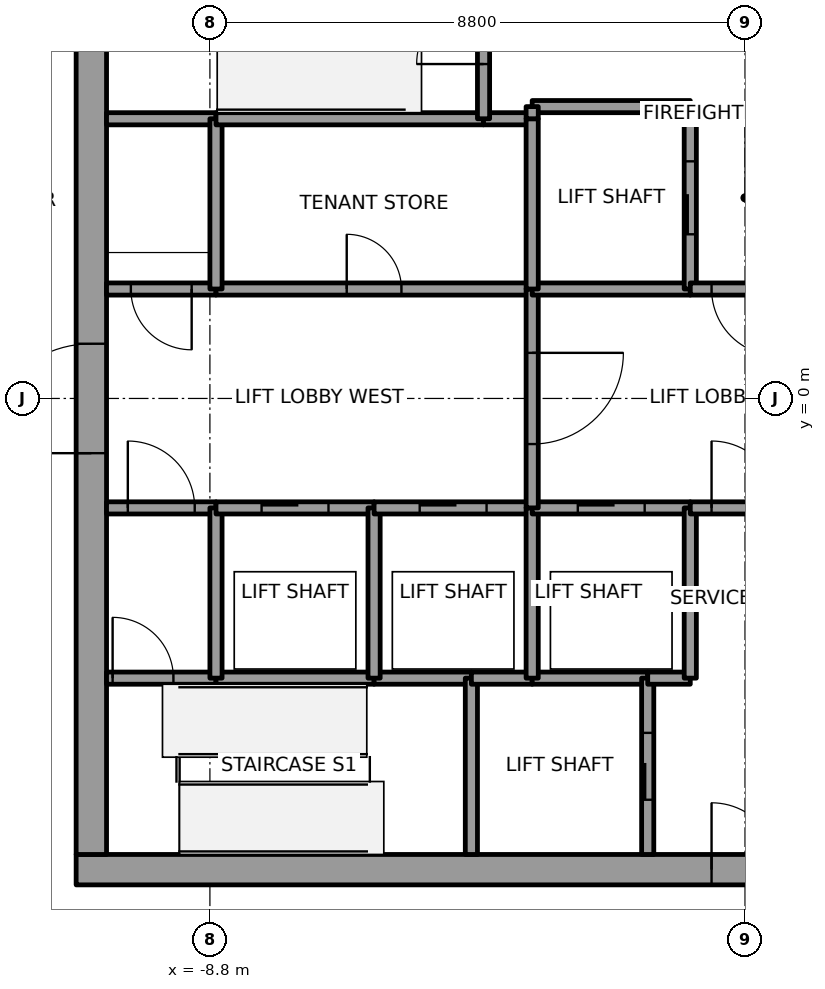
"""IFC4 building model, lengths in metres.
Left out: names, types, materials, properties, quantities, classifications, styles, units other than length and angle.
Written with IfcOpenShell. Run it as: python <this file> out.ifc"""

import sys

from ifc_helpers import new_model, si_unit, direction, frame, frame_2d, origin, place, context, subcontext, project, spatial, rectangle, extrude, element, fill, save


model = new_model("IFC4")
c1 = context("Model", 3, precision=1e-05, world=origin(), true_north=direction((0.0, 1.0)))
c2 = subcontext(c1, "Body", "Model", "MODEL_VIEW")
j1 = project(units=[si_unit("LENGTHUNIT", "METRE"), si_unit("PLANEANGLEUNIT", "RADIAN")], contexts=[c1])
p1 = place(None, origin())
s1 = spatial("IfcSite", under=j1, at=p1, CompositionType="ELEMENT")
p2 = place(p1, origin())
s2 = spatial("IfcBuilding", under=s1, at=p2, CompositionType="ELEMENT")
p3 = place(p2, frame((0.0, 0.0, 231.0)))
s3 = spatial("IfcBuildingStorey", under=s2, at=p3, CompositionType="ELEMENT", Elevation=231.0)
p4 = place(p3, frame((-11.0, -7.75, 0.0), z_axis=(0.0, 0.0, 1.0), x_axis=(1.0, 0.0, 0.0)))
e1 = element("IfcWall", 1, at=p4, inside=s3, PredefinedType="SHEAR", context=c2, shape_type="SweptSolid", body=[
    extrude(rectangle(XDim=22.0, YDim=0.5, at=frame_2d((11.0, 0.0))), origin(), (0.0, 0.0, 1.0), 4.0),
])
p5 = place(p4, frame((10.45, 0.0, 0.0)))
e2 = element("IfcOpeningElement", 2, at=p5, cuts=e1, PredefinedType="OPENING", context=c2, shape_type="SweptSolid", body=[
    extrude(rectangle(XDim=1.1, YDim=2.1, at=frame_2d((0.55, 1.05))), frame((0.0, 0.25, 0.0), z_axis=(0.0, -1.0, 0.0), x_axis=(1.0, 0.0, 0.0)), (0.0, 0.0, 1.0), 0.5),
])
p6 = place(p3, frame((-10.75, -7.5, 0.0), z_axis=(0.0, 0.0, 1.0), x_axis=(0.0, 1.0, 0.0)))
e3 = element("IfcWall", 3, at=p6, inside=s3, PredefinedType="SHEAR", context=c2, shape_type="SweptSolid", body=[
    extrude(rectangle(XDim=15.0, YDim=0.5, at=frame_2d((7.5, 0.0))), origin(), (0.0, 0.0, 1.0), 4.0),
])
p7 = place(p6, frame((6.6, 0.0, 0.0)))
e4 = element("IfcOpeningElement", 4, at=p7, cuts=e3, PredefinedType="OPENING", context=c2, shape_type="SweptSolid", body=[
    extrude(rectangle(XDim=1.8, YDim=2.1, at=frame_2d((0.9, 1.05))), frame((0.0, 0.25, 0.0), z_axis=(0.0, -1.0, 0.0), x_axis=(1.0, 0.0, 0.0)), (0.0, 0.0, 1.0), 0.5),
])
p8 = place(p3, frame((-10.5, -4.6, 0.0), z_axis=(0.0, 0.0, 1.0), x_axis=(1.0, 0.0, 0.0)))
e5 = element("IfcWall", 5, at=p8, inside=s3, PredefinedType="SOLIDWALL", context=c2, shape_type="SweptSolid", body=[
    extrude(rectangle(XDim=1.8, YDim=0.2, at=frame_2d((0.9, 0.0))), origin(), (0.0, 0.0, 1.0), 3.85),
])
p9 = place(p8, frame((0.1, 0.0, 0.0)))
e6 = element("IfcOpeningElement", 6, at=p9, cuts=e5, PredefinedType="OPENING", context=c2, shape_type="SweptSolid", body=[
    extrude(rectangle(XDim=1.0, YDim=2.1, at=frame_2d((0.5, 1.05))), frame((0.0, 0.1, 0.0), z_axis=(0.0, -1.0, 0.0), x_axis=(1.0, 0.0, 0.0)), (0.0, 0.0, 1.0), 0.2),
])
p10 = place(p3, frame((-10.5, -1.8, 0.0), z_axis=(0.0, 0.0, 1.0), x_axis=(1.0, 0.0, 0.0)))
e7 = element("IfcWall", 7, at=p10, inside=s3, PredefinedType="SOLIDWALL", context=c2, shape_type="SweptSolid", body=[
    extrude(rectangle(XDim=1.8, YDim=0.2, at=frame_2d((0.9, 0.0))), origin(), (0.0, 0.0, 1.0), 3.85),
])
p11 = place(p10, frame((0.35, 0.0, 0.0)))
e8 = element("IfcOpeningElement", 8, at=p11, cuts=e7, PredefinedType="OPENING", context=c2, shape_type="SweptSolid", body=[
    extrude(rectangle(XDim=1.1, YDim=2.1, at=frame_2d((0.55, 1.05))), frame((0.0, 0.1, 0.0), z_axis=(0.0, -1.0, 0.0), x_axis=(1.0, 0.0, 0.0)), (0.0, 0.0, 1.0), 0.2),
])
p12 = place(p3, frame((-8.7, 1.8, 0.0), z_axis=(0.0, 0.0, 1.0), x_axis=(-1.0, 0.0, 0.0)))
e9 = element("IfcWall", 9, at=p12, inside=s3, PredefinedType="SOLIDWALL", context=c2, shape_type="SweptSolid", body=[
    extrude(rectangle(XDim=1.8, YDim=0.2, at=frame_2d((0.9, 0.0))), origin(), (0.0, 0.0, 1.0), 3.85),
])
p13 = place(p12, frame((0.4, 0.0, 0.0)))
e10 = element("IfcOpeningElement", 10, at=p13, cuts=e9, PredefinedType="OPENING", context=c2, shape_type="SweptSolid", body=[
    extrude(rectangle(XDim=1.0, YDim=2.1, at=frame_2d((0.5, 1.05))), frame((0.0, 0.1, 0.0), z_axis=(0.0, -1.0, 0.0), x_axis=(1.0, 0.0, 0.0)), (0.0, 0.0, 1.0), 0.2),
])
p14 = place(p3, frame((-8.7, 4.6, 0.0), z_axis=(0.0, 0.0, 1.0), x_axis=(-1.0, 0.0, 0.0)))
e11 = element("IfcWall", 11, at=p14, inside=s3, PredefinedType="SOLIDWALL", context=c2, shape_type="SweptSolid", body=[
    extrude(rectangle(XDim=1.8, YDim=0.2, at=frame_2d((0.9, 0.0))), origin(), (0.0, 0.0, 1.0), 3.85),
])
p15 = place(p3, frame((-8.7, -4.6, 0.0), z_axis=(0.0, 0.0, 1.0), x_axis=(1.0, 0.0, 0.0)))
e12 = element("IfcWall", 12, at=p15, inside=s3, PredefinedType="SOLIDWALL", context=c2, shape_type="SweptSolid", body=[
    extrude(rectangle(XDim=2.6, YDim=0.2, at=frame_2d((1.3, 0.0))), origin(), (0.0, 0.0, 1.0), 3.85),
])
p16 = place(p3, frame((-8.7, -4.6, 0.0), z_axis=(0.0, 0.0, 1.0), x_axis=(0.0, 1.0, 0.0)))
e13 = element("IfcWall", 13, at=p16, inside=s3, PredefinedType="SOLIDWALL", context=c2, shape_type="SweptSolid", body=[
    extrude(rectangle(XDim=2.8, YDim=0.2, at=frame_2d((1.4, 0.0))), origin(), (0.0, 0.0, 1.0), 3.85),
])
p17 = place(p3, frame((-8.7, -1.8, 0.0), z_axis=(0.0, 0.0, 1.0), x_axis=(1.0, 0.0, 0.0)))
e14 = element("IfcWall", 14, at=p17, inside=s3, PredefinedType="SOLIDWALL", context=c2, shape_type="SweptSolid", body=[
    extrude(rectangle(XDim=2.6, YDim=0.2, at=frame_2d((1.3, 0.0))), origin(), (0.0, 0.0, 1.0), 3.85),
])
p18 = place(p17, frame((0.75, 0.0, 0.0)))
e15 = element("IfcOpeningElement", 15, at=p18, cuts=e14, PredefinedType="OPENING", context=c2, shape_type="SweptSolid", body=[
    extrude(rectangle(XDim=1.1, YDim=2.1, at=frame_2d((0.55, 1.05))), frame((0.0, 0.1, 0.0), z_axis=(0.0, -1.0, 0.0), x_axis=(1.0, 0.0, 0.0)), (0.0, 0.0, 1.0), 0.2),
])
p19 = place(p3, frame((-8.7, 1.8, 0.0), z_axis=(0.0, 0.0, 1.0), x_axis=(1.0, 0.0, 0.0)))
e16 = element("IfcWall", 16, at=p19, inside=s3, PredefinedType="SOLIDWALL", context=c2, shape_type="SweptSolid", body=[
    extrude(rectangle(XDim=5.2, YDim=0.2, at=frame_2d((2.6, 0.0))), origin(), (0.0, 0.0, 1.0), 3.85),
])
p20 = place(p19, frame((2.15, 0.0, 0.0)))
e17 = element("IfcOpeningElement", 17, at=p20, cuts=e16, PredefinedType="OPENING", context=c2, shape_type="SweptSolid", body=[
    extrude(rectangle(XDim=0.9, YDim=2.1, at=frame_2d((0.45, 1.05))), frame((0.0, 0.1, 0.0), z_axis=(0.0, -1.0, 0.0), x_axis=(1.0, 0.0, 0.0)), (0.0, 0.0, 1.0), 0.2),
])
p21 = place(p3, frame((-8.7, 4.6, 0.0), z_axis=(0.0, 0.0, 1.0), x_axis=(0.0, -1.0, 0.0)))
e18 = element("IfcWall", 18, at=p21, inside=s3, PredefinedType="SOLIDWALL", context=c2, shape_type="SweptSolid", body=[
    extrude(rectangle(XDim=2.8, YDim=0.2, at=frame_2d((1.4, 0.0))), origin(), (0.0, 0.0, 1.0), 3.85),
])
p22 = place(p3, frame((-4.3, 4.6, 0.0), z_axis=(0.0, 0.0, 1.0), x_axis=(-1.0, 0.0, 0.0)))
e19 = element("IfcWall", 19, at=p22, inside=s3, PredefinedType="SOLIDWALL", context=c2, shape_type="SweptSolid", body=[
    extrude(rectangle(XDim=4.4, YDim=0.2, at=frame_2d((2.2, 0.0))), origin(), (0.0, 0.0, 1.0), 3.85),
])
p23 = place(p3, frame((-6.1, -4.6, 0.0), z_axis=(0.0, 0.0, 1.0), x_axis=(1.0, 0.0, 0.0)))
e20 = element("IfcWall", 20, at=p23, inside=s3, PredefinedType="SOLIDWALL", context=c2, shape_type="SweptSolid", body=[
    extrude(rectangle(XDim=1.6, YDim=0.2, at=frame_2d((0.8, 0.0))), origin(), (0.0, 0.0, 1.0), 3.85),
])
p24 = place(p3, frame((-6.1, -4.6, 0.0), z_axis=(0.0, 0.0, 1.0), x_axis=(0.0, 1.0, 0.0)))
e21 = element("IfcWall", 21, at=p24, inside=s3, PredefinedType="SOLIDWALL", context=c2, shape_type="SweptSolid", body=[
    extrude(rectangle(XDim=2.8, YDim=0.2, at=frame_2d((1.4, 0.0))), origin(), (0.0, 0.0, 1.0), 3.85),
])
p25 = place(p3, frame((-6.1, -1.8, 0.0), z_axis=(0.0, 0.0, 1.0), x_axis=(1.0, 0.0, 0.0)))
e22 = element("IfcWall", 22, at=p25, inside=s3, PredefinedType="SOLIDWALL", context=c2, shape_type="SweptSolid", body=[
    extrude(rectangle(XDim=2.6, YDim=0.2, at=frame_2d((1.3, 0.0))), origin(), (0.0, 0.0, 1.0), 3.85),
])
p26 = place(p25, frame((0.75, 0.0, 0.0)))
e23 = element("IfcOpeningElement", 23, at=p26, cuts=e22, PredefinedType="OPENING", context=c2, shape_type="SweptSolid", body=[
    extrude(rectangle(XDim=1.1, YDim=2.1, at=frame_2d((0.55, 1.05))), frame((0.0, 0.1, 0.0), z_axis=(0.0, -1.0, 0.0), x_axis=(1.0, 0.0, 0.0)), (0.0, 0.0, 1.0), 0.2),
])
p27 = place(p3, frame((-4.5, -4.6, 0.0), z_axis=(0.0, 0.0, 1.0), x_axis=(0.0, -1.0, 0.0)))
e24 = element("IfcWall", 24, at=p27, inside=s3, PredefinedType="SOLIDWALL", context=c2, shape_type="SweptSolid", body=[
    extrude(rectangle(XDim=2.9, YDim=0.2, at=frame_2d((1.45, 0.0))), origin(), (0.0, 0.0, 1.0), 3.85),
])
p28 = place(p3, frame((-4.5, -4.6, 0.0), z_axis=(0.0, 0.0, 1.0), x_axis=(1.0, 0.0, 0.0)))
e25 = element("IfcWall", 25, at=p28, inside=s3, PredefinedType="SOLIDWALL", context=c2, shape_type="SweptSolid", body=[
    extrude(rectangle(XDim=1.0, YDim=0.2, at=frame_2d((0.5, 0.0))), origin(), (0.0, 0.0, 1.0), 3.85),
])
p29 = place(p3, frame((-3.5, 4.6, 0.0), z_axis=(0.0, 0.0, 1.0), x_axis=(-1.0, 0.0, 0.0)))
e26 = element("IfcWall", 26, at=p29, inside=s3, PredefinedType="SOLIDWALL", context=c2, shape_type="SweptSolid", body=[
    extrude(rectangle(XDim=0.8, YDim=0.2, at=frame_2d((0.4, 0.0))), origin(), (0.0, 0.0, 1.0), 3.85),
])
p30 = place(p3, frame((-4.3, 4.6, 0.0), z_axis=(0.0, 0.0, 1.0), x_axis=(0.0, 1.0, 0.0)))
e27 = element("IfcWall", 27, at=p30, inside=s3, PredefinedType="SOLIDWALL", context=c2, shape_type="SweptSolid", body=[
    extrude(rectangle(XDim=2.9, YDim=0.2, at=frame_2d((1.45, 0.0))), origin(), (0.0, 0.0, 1.0), 3.85),
])
p31 = place(p30, frame((0.9, 0.0, 0.0)))
e28 = element("IfcOpeningElement", 28, at=p31, cuts=e27, PredefinedType="OPENING", context=c2, shape_type="SweptSolid", body=[
    extrude(rectangle(XDim=1.1, YDim=2.1, at=frame_2d((0.55, 1.05))), frame((0.0, 0.1, 0.0), z_axis=(0.0, -1.0, 0.0), x_axis=(1.0, 0.0, 0.0)), (0.0, 0.0, 1.0), 0.2),
])
p32 = place(p3, frame((-3.5, -4.6, 0.0), z_axis=(0.0, 0.0, 1.0), x_axis=(1.0, 0.0, 0.0)))
e29 = element("IfcWall", 29, at=p32, inside=s3, PredefinedType="SOLIDWALL", context=c2, shape_type="SweptSolid", body=[
    extrude(rectangle(XDim=1.9, YDim=0.2, at=frame_2d((0.95, 0.0))), origin(), (0.0, 0.0, 1.0), 3.85),
])
p33 = place(p3, frame((-3.5, -4.6, 0.0), z_axis=(0.0, 0.0, 1.0), x_axis=(0.0, 1.0, 0.0)))
e30 = element("IfcWall", 30, at=p33, inside=s3, PredefinedType="SOLIDWALL", context=c2, shape_type="SweptSolid", body=[
    extrude(rectangle(XDim=2.8, YDim=0.2, at=frame_2d((1.4, 0.0))), origin(), (0.0, 0.0, 1.0), 3.85),
])
p34 = place(p3, frame((-3.5, -1.8, 0.0), z_axis=(0.0, 0.0, 1.0), x_axis=(1.0, 0.0, 0.0)))
e31 = element("IfcWall", 31, at=p34, inside=s3, PredefinedType="SOLIDWALL", context=c2, shape_type="SweptSolid", body=[
    extrude(rectangle(XDim=2.6, YDim=0.2, at=frame_2d((1.3, 0.0))), origin(), (0.0, 0.0, 1.0), 3.85),
])
p35 = place(p34, frame((0.75, 0.0, 0.0)))
e32 = element("IfcOpeningElement", 32, at=p35, cuts=e31, PredefinedType="OPENING", context=c2, shape_type="SweptSolid", body=[
    extrude(rectangle(XDim=1.1, YDim=2.1, at=frame_2d((0.55, 1.05))), frame((0.0, 0.1, 0.0), z_axis=(0.0, -1.0, 0.0), x_axis=(1.0, 0.0, 0.0)), (0.0, 0.0, 1.0), 0.2),
])
p36 = place(p3, frame((-3.5, 1.8, 0.0), z_axis=(0.0, 0.0, 1.0), x_axis=(0.0, -1.0, 0.0)))
e33 = element("IfcWall", 33, at=p36, inside=s3, PredefinedType="SOLIDWALL", context=c2, shape_type="SweptSolid", body=[
    extrude(rectangle(XDim=3.6, YDim=0.2, at=frame_2d((1.8, 0.0))), origin(), (0.0, 0.0, 1.0), 3.85),
])
p37 = place(p36, frame((1.05, 0.0, 0.0)))
e34 = element("IfcOpeningElement", 34, at=p37, cuts=e33, PredefinedType="OPENING", context=c2, shape_type="SweptSolid", body=[
    extrude(rectangle(XDim=1.5, YDim=2.1, at=frame_2d((0.75, 1.05))), frame((0.0, 0.1, 0.0), z_axis=(0.0, -1.0, 0.0), x_axis=(1.0, 0.0, 0.0)), (0.0, 0.0, 1.0), 0.2),
])
p38 = place(p3, frame((-0.9, 1.8, 0.0), z_axis=(0.0, 0.0, 1.0), x_axis=(-1.0, 0.0, 0.0)))
e35 = element("IfcWall", 35, at=p38, inside=s3, PredefinedType="SOLIDWALL", context=c2, shape_type="SweptSolid", body=[
    extrude(rectangle(XDim=2.6, YDim=0.2, at=frame_2d((1.3, 0.0))), origin(), (0.0, 0.0, 1.0), 3.85),
])
p39 = place(p3, frame((-3.5, 1.8, 0.0), z_axis=(0.0, 0.0, 1.0), x_axis=(0.0, 1.0, 0.0)))
e36 = element("IfcWall", 36, at=p39, inside=s3, PredefinedType="SOLIDWALL", context=c2, shape_type="SweptSolid", body=[
    extrude(rectangle(XDim=2.8, YDim=0.2, at=frame_2d((1.4, 0.0))), origin(), (0.0, 0.0, 1.0), 3.85),
])
p40 = place(p3, frame((-0.9, 1.8, 0.0), z_axis=(0.0, 0.0, 1.0), x_axis=(0.0, 1.0, 0.0)))
e37 = element("IfcWall", 37, at=p40, inside=s3, PredefinedType="SOLIDWALL", context=c2, shape_type="SweptSolid", body=[
    extrude(rectangle(XDim=3.0, YDim=0.2, at=frame_2d((1.5, 0.0))), origin(), (0.0, 0.0, 1.0), 3.85),
])
p41 = place(p40, frame((0.9, 0.0, 0.0)))
e38 = element("IfcOpeningElement", 38, at=p41, cuts=e37, PredefinedType="OPENING", context=c2, shape_type="SweptSolid", body=[
    extrude(rectangle(XDim=1.2, YDim=2.1, at=frame_2d((0.6, 1.05))), frame((0.0, 0.1, 0.0), z_axis=(0.0, -1.0, 0.0), x_axis=(1.0, 0.0, 0.0)), (0.0, 0.0, 1.0), 0.2),
])
p42 = place(p3, frame((-0.9, 4.8, 0.0), z_axis=(0.0, 0.0, 1.0), x_axis=(-1.0, 0.0, 0.0)))
e39 = element("IfcWall", 39, at=p42, inside=s3, PredefinedType="SOLIDWALL", context=c2, shape_type="SweptSolid", body=[
    extrude(rectangle(XDim=2.6, YDim=0.2, at=frame_2d((1.3, 0.0))), origin(), (0.0, 0.0, 1.0), 3.85),
])
p43 = place(p3, frame((-3.5, 4.8, 0.0), z_axis=(0.0, 0.0, 1.0), x_axis=(0.0, -1.0, 0.0)))
e40 = element("IfcWall", 40, at=p43, inside=s3, PredefinedType="SOLIDWALL", context=c2, shape_type="SweptSolid", body=[
    extrude(rectangle(XDim=0.2, YDim=0.2, at=frame_2d((0.1, 0.0))), origin(), (0.0, 0.0, 1.0), 3.85),
])
p44 = place(p3, frame((-1.6, -7.5, 0.0), z_axis=(0.0, 0.0, 1.0), x_axis=(0.0, 1.0, 0.0)))
e41 = element("IfcWall", 41, at=p44, inside=s3, PredefinedType="SOLIDWALL", context=c2, shape_type="SweptSolid", body=[
    extrude(rectangle(XDim=2.9, YDim=0.2, at=frame_2d((1.45, 0.0))), origin(), (0.0, 0.0, 1.0), 3.85),
])
p45 = place(p44, frame((0.9, 0.0, 0.0)))
e42 = element("IfcOpeningElement", 42, at=p45, cuts=e41, PredefinedType="OPENING", context=c2, shape_type="SweptSolid", body=[
    extrude(rectangle(XDim=1.1, YDim=2.1, at=frame_2d((0.55, 1.05))), frame((0.0, 0.1, 0.0), z_axis=(0.0, -1.0, 0.0), x_axis=(1.0, 0.0, 0.0)), (0.0, 0.0, 1.0), 0.2),
])
p46 = place(p3, frame((-1.6, -4.6, 0.0), z_axis=(0.0, 0.0, 1.0), x_axis=(1.0, 0.0, 0.0)))
e43 = element("IfcWall", 43, at=p46, inside=s3, PredefinedType="SOLIDWALL", context=c2, shape_type="SweptSolid", body=[
    extrude(rectangle(XDim=0.7, YDim=0.2, at=frame_2d((0.35, 0.0))), origin(), (0.0, 0.0, 1.0), 3.85),
])
p47 = place(p3, frame((-0.9, -4.6, 0.0), z_axis=(0.0, 0.0, 1.0), x_axis=(0.0, 1.0, 0.0)))
e44 = element("IfcWall", 44, at=p47, inside=s3, PredefinedType="SOLIDWALL", context=c2, shape_type="SweptSolid", body=[
    extrude(rectangle(XDim=2.8, YDim=0.2, at=frame_2d((1.4, 0.0))), origin(), (0.0, 0.0, 1.0), 3.85),
])
p48 = place(p3, frame((-0.9, -1.8, 0.0), z_axis=(0.0, 0.0, 1.0), x_axis=(1.0, 0.0, 0.0)))
e45 = element("IfcWall", 45, at=p48, inside=s3, PredefinedType="SOLIDWALL", context=c2, shape_type="SweptSolid", body=[
    extrude(rectangle(XDim=1.8, YDim=0.2, at=frame_2d((0.9, 0.0))), origin(), (0.0, 0.0, 1.0), 3.85),
])
p49 = place(p48, frame((0.35, 0.0, 0.0)))
e46 = element("IfcOpeningElement", 46, at=p49, cuts=e45, PredefinedType="OPENING", context=c2, shape_type="SweptSolid", body=[
    extrude(rectangle(XDim=1.1, YDim=2.1, at=frame_2d((0.55, 1.05))), frame((0.0, 0.1, 0.0), z_axis=(0.0, -1.0, 0.0), x_axis=(1.0, 0.0, 0.0)), (0.0, 0.0, 1.0), 0.2),
])
p50 = place(p3, frame((0.9, 1.8, 0.0), z_axis=(0.0, 0.0, 1.0), x_axis=(-1.0, 0.0, 0.0)))
e47 = element("IfcWall", 47, at=p50, inside=s3, PredefinedType="SOLIDWALL", context=c2, shape_type="SweptSolid", body=[
    extrude(rectangle(XDim=1.8, YDim=0.2, at=frame_2d((0.9, 0.0))), origin(), (0.0, 0.0, 1.0), 3.85),
])
p51 = place(p50, frame((0.35, 0.0, 0.0)))
e48 = element("IfcOpeningElement", 48, at=p51, cuts=e47, PredefinedType="OPENING", context=c2, shape_type="SweptSolid", body=[
    extrude(rectangle(XDim=1.1, YDim=2.1, at=frame_2d((0.55, 1.05))), frame((0.0, 0.1, 0.0), z_axis=(0.0, -1.0, 0.0), x_axis=(1.0, 0.0, 0.0)), (0.0, 0.0, 1.0), 0.2),
])
p52 = place(p18, origin())
e49 = element("IfcDoor", 49, at=p52, inside=s3, OperationType="SLIDING_TO_LEFT", PredefinedType="DOOR", context=c2, shape_type="SweptSolid", body=[
    extrude(rectangle(XDim=1.1, YDim=2.1, at=frame_2d((0.55, 1.05))), frame((0.0, 0.025, 0.0), z_axis=(0.0, -1.0, 0.0), x_axis=(1.0, 0.0, 0.0)), (0.0, 0.0, 1.0), 0.05),
])
fill(e15, e49)
p53 = place(p26, origin())
e50 = element("IfcDoor", 50, at=p53, inside=s3, OperationType="SLIDING_TO_RIGHT", PredefinedType="DOOR", context=c2, shape_type="SweptSolid", body=[
    extrude(rectangle(XDim=1.1, YDim=2.1, at=frame_2d((0.55, 1.05))), frame((0.0, 0.025, 0.0), z_axis=(0.0, -1.0, 0.0), x_axis=(1.0, 0.0, 0.0)), (0.0, 0.0, 1.0), 0.05),
])
fill(e23, e50)
p54 = place(p35, origin())
e51 = element("IfcDoor", 51, at=p54, inside=s3, OperationType="SLIDING_TO_LEFT", PredefinedType="DOOR", context=c2, shape_type="SweptSolid", body=[
    extrude(rectangle(XDim=1.1, YDim=2.1, at=frame_2d((0.55, 1.05))), frame((0.0, 0.025, 0.0), z_axis=(0.0, -1.0, 0.0), x_axis=(1.0, 0.0, 0.0)), (0.0, 0.0, 1.0), 0.05),
])
fill(e32, e51)
p55 = place(p41, origin())
e52 = element("IfcDoor", 52, at=p55, inside=s3, OperationType="SLIDING_TO_LEFT", PredefinedType="DOOR", context=c2, shape_type="SweptSolid", body=[
    extrude(rectangle(XDim=1.2, YDim=2.1, at=frame_2d((0.6, 1.05))), frame((0.0, 0.025, 0.0), z_axis=(0.0, -1.0, 0.0), x_axis=(1.0, 0.0, 0.0)), (0.0, 0.0, 1.0), 0.05),
])
fill(e38, e52)
p56 = place(p45, origin())
e53 = element("IfcDoor", 53, at=p56, inside=s3, OperationType="SLIDING_TO_LEFT", PredefinedType="DOOR", context=c2, shape_type="SweptSolid", body=[
    extrude(rectangle(XDim=1.1, YDim=2.1, at=frame_2d((0.55, 1.05))), frame((0.0, 0.025, 0.0), z_axis=(0.0, -1.0, 0.0), x_axis=(1.0, 0.0, 0.0)), (0.0, 0.0, 1.0), 0.05),
])
fill(e42, e53)
p57 = place(p37, origin())
e54 = element("IfcDoor", 54, at=p57, inside=s3, OperationType="DOUBLE_DOOR_SINGLE_SWING", PredefinedType="DOOR", context=c2, shape_type="SweptSolid", body=[
    extrude(rectangle(XDim=1.5, YDim=2.1, at=frame_2d((0.75, 1.05))), frame((0.0, 0.025, 0.0), z_axis=(0.0, -1.0, 0.0), x_axis=(1.0, 0.0, 0.0)), (0.0, 0.0, 1.0), 0.05),
])
fill(e34, e54)
p58 = place(p11, origin())
e55 = element("IfcDoor", 55, at=p58, inside=s3, OperationType="SINGLE_SWING_RIGHT", PredefinedType="DOOR", context=c2, shape_type="SweptSolid", body=[
    extrude(rectangle(XDim=1.1, YDim=2.1, at=frame_2d((0.55, 1.05))), frame((0.0, 0.025, 0.0), z_axis=(0.0, -1.0, 0.0), x_axis=(1.0, 0.0, 0.0)), (0.0, 0.0, 1.0), 0.05),
])
fill(e8, e55)
p59 = place(p51, origin())
e56 = element("IfcDoor", 56, at=p59, inside=s3, OperationType="SINGLE_SWING_RIGHT", PredefinedType="DOOR", context=c2, shape_type="SweptSolid", body=[
    extrude(rectangle(XDim=1.1, YDim=2.1, at=frame_2d((0.55, 1.05))), frame((0.0, 0.025, 0.0), z_axis=(0.0, -1.0, 0.0), x_axis=(1.0, 0.0, 0.0)), (0.0, 0.0, 1.0), 0.05),
])
fill(e48, e56)
p60 = place(p49, origin())
e57 = element("IfcDoor", 57, at=p60, inside=s3, OperationType="SINGLE_SWING_RIGHT", PredefinedType="DOOR", context=c2, shape_type="SweptSolid", body=[
    extrude(rectangle(XDim=1.1, YDim=2.1, at=frame_2d((0.55, 1.05))), frame((0.0, 0.025, 0.0), z_axis=(0.0, -1.0, 0.0), x_axis=(1.0, 0.0, 0.0)), (0.0, 0.0, 1.0), 0.05),
])
fill(e46, e57)
p61 = place(p13, origin())
e58 = element("IfcDoor", 58, at=p61, inside=s3, OperationType="SINGLE_SWING_LEFT", PredefinedType="DOOR", context=c2, shape_type="SweptSolid", body=[
    extrude(rectangle(XDim=1.0, YDim=2.1, at=frame_2d((0.5, 1.05))), frame((0.0, 0.025, 0.0), z_axis=(0.0, -1.0, 0.0), x_axis=(1.0, 0.0, 0.0)), (0.0, 0.0, 1.0), 0.05),
])
fill(e10, e58)
p62 = place(p9, origin())
e59 = element("IfcDoor", 59, at=p62, inside=s3, OperationType="SINGLE_SWING_LEFT", PredefinedType="DOOR", context=c2, shape_type="SweptSolid", body=[
    extrude(rectangle(XDim=1.0, YDim=2.1, at=frame_2d((0.5, 1.05))), frame((0.0, 0.025, 0.0), z_axis=(0.0, -1.0, 0.0), x_axis=(1.0, 0.0, 0.0)), (0.0, 0.0, 1.0), 0.05),
])
fill(e6, e59)
p63 = place(p31, origin())
e60 = element("IfcDoor", 60, at=p63, inside=s3, OperationType="SINGLE_SWING_LEFT", PredefinedType="DOOR", context=c2, shape_type="SweptSolid", body=[
    extrude(rectangle(XDim=1.1, YDim=2.1, at=frame_2d((0.55, 1.05))), frame((0.0, 0.025, 0.0), z_axis=(0.0, -1.0, 0.0), x_axis=(1.0, 0.0, 0.0)), (0.0, 0.0, 1.0), 0.05),
])
fill(e28, e60)
p64 = place(p20, origin())
e61 = element("IfcDoor", 61, at=p64, inside=s3, OperationType="SINGLE_SWING_LEFT", PredefinedType="DOOR", context=c2, shape_type="SweptSolid", body=[
    extrude(rectangle(XDim=0.9, YDim=2.1, at=frame_2d((0.45, 1.05))), frame((0.0, 0.025, 0.0), z_axis=(0.0, -1.0, 0.0), x_axis=(1.0, 0.0, 0.0)), (0.0, 0.0, 1.0), 0.05),
])
fill(e17, e61)
p65 = place(p7, origin())
e62 = element("IfcDoor", 62, at=p65, inside=s3, OperationType="DOUBLE_DOOR_SINGLE_SWING", PredefinedType="DOOR", context=c2, shape_type="SweptSolid", body=[
    extrude(rectangle(XDim=1.8, YDim=2.1, at=frame_2d((0.9, 1.05))), frame((0.0, 0.025, 0.0), z_axis=(0.0, -1.0, 0.0), x_axis=(1.0, 0.0, 0.0)), (0.0, 0.0, 1.0), 0.05),
])
fill(e4, e62)
p66 = place(p5, origin())
e63 = element("IfcDoor", 63, at=p66, inside=s3, OperationType="SINGLE_SWING_RIGHT", PredefinedType="DOOR", context=c2, shape_type="SweptSolid", body=[
    extrude(rectangle(XDim=1.1, YDim=2.1, at=frame_2d((0.55, 1.05))), frame((0.0, 0.025, 0.0), z_axis=(0.0, -1.0, 0.0), x_axis=(1.0, 0.0, 0.0)), (0.0, 0.0, 1.0), 0.05),
])
fill(e2, e63)
save(model, sys.argv[1])
